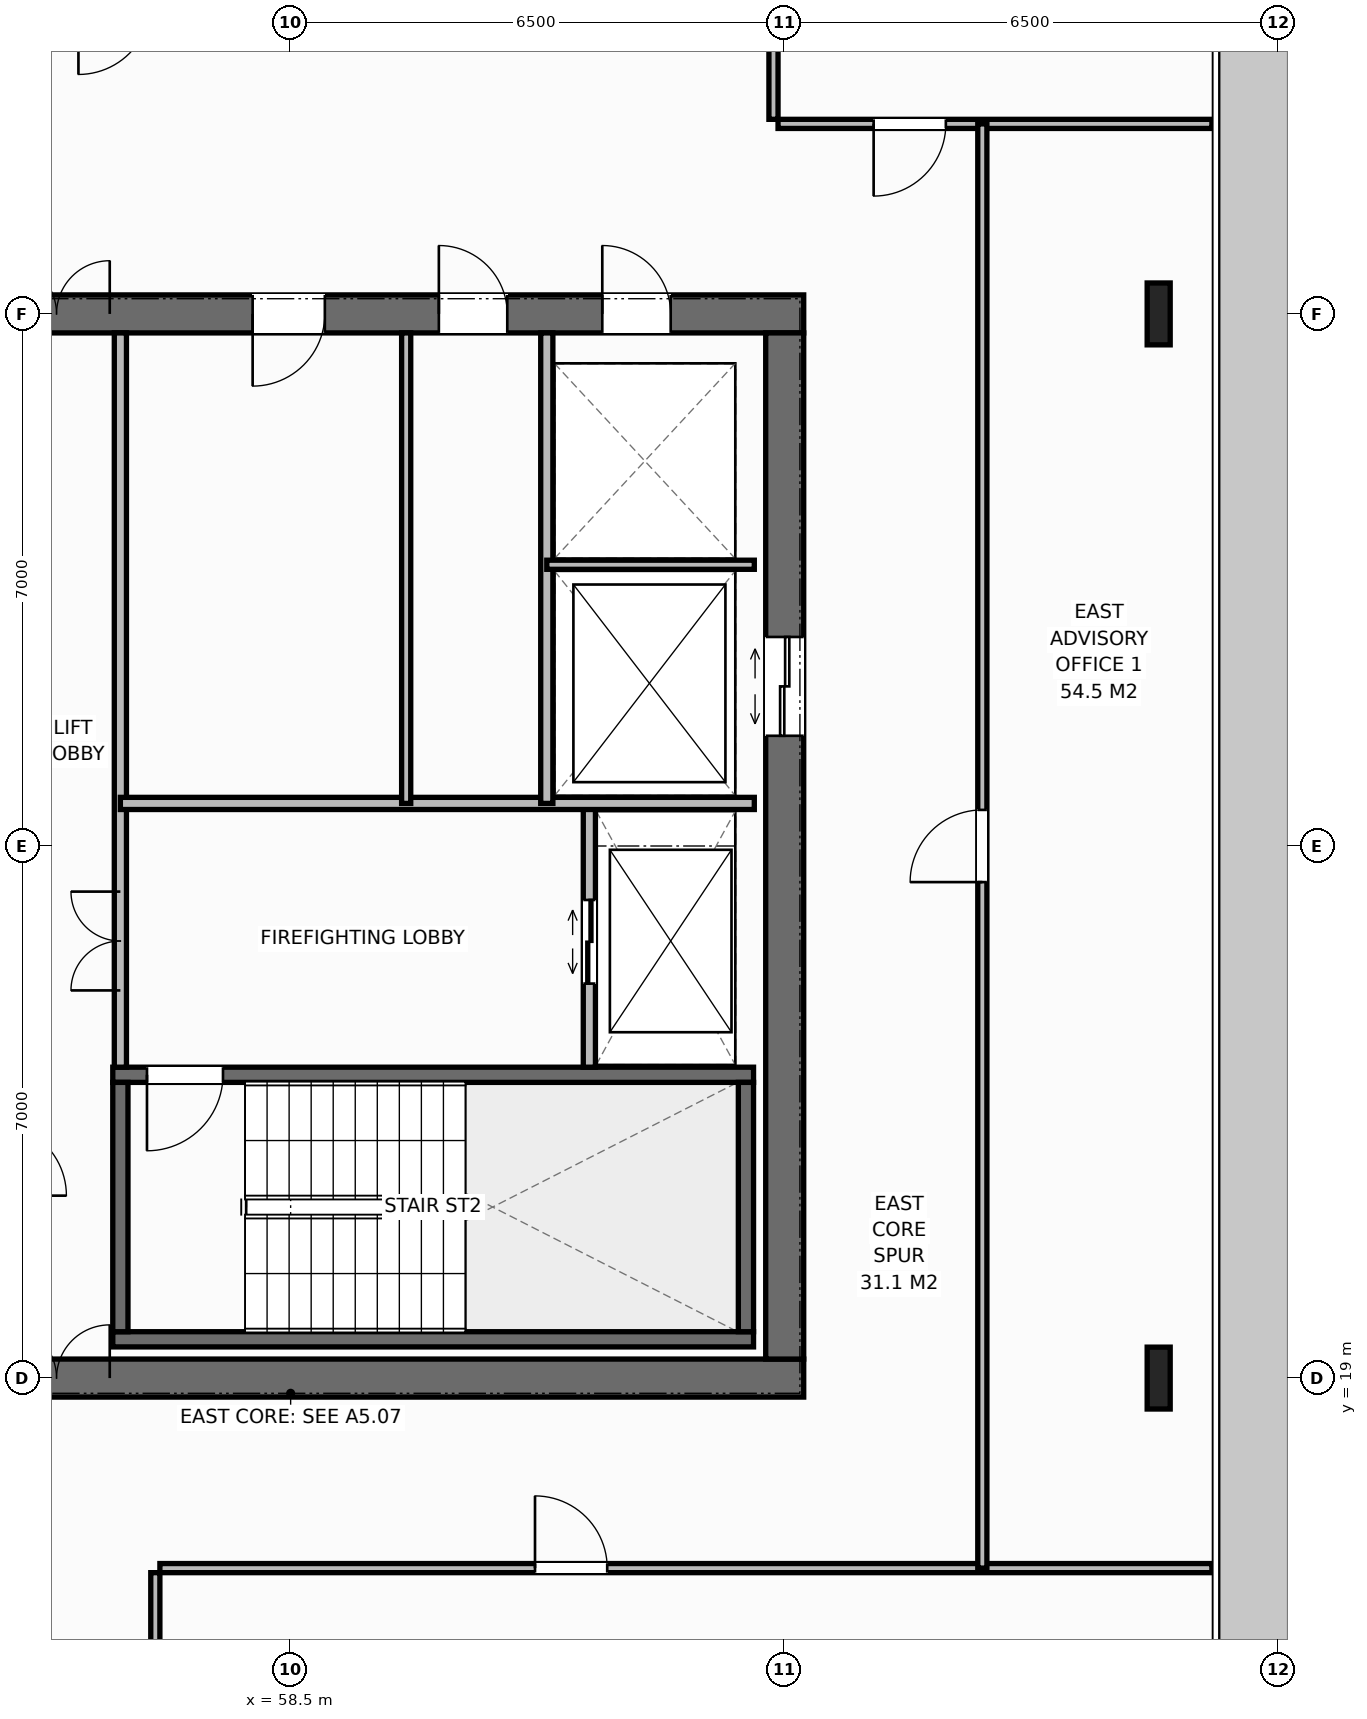
"""IFC4 building model, lengths in metres.
Left out: names, types, materials, properties, quantities, classifications, styles, units other than length and angle.
Written with IfcOpenShell. Run it as: python <this file> out.ifc"""

import sys

from ifc_helpers import new_model, si_unit, direction, frame, frame_2d, origin, origin_2d, place, context, subcontext, project, spatial, rectangle, i_section, extrude, element, fill, save


model = new_model("IFC4")
c1 = context("Model", 3, precision=1e-05, world=origin(), true_north=direction((0.0, 1.0)))
c2 = subcontext(c1, "Body", "Model", "MODEL_VIEW")
j1 = project(units=[si_unit("LENGTHUNIT", "METRE"), si_unit("PLANEANGLEUNIT", "RADIAN")], contexts=[c1])
p1 = place(None, origin())
s1 = spatial("IfcSite", under=j1, at=p1, CompositionType="ELEMENT")
p2 = place(p1, origin())
s2 = spatial("IfcBuilding", under=s1, at=p2, CompositionType="ELEMENT")
p3 = place(p2, frame((0.0, 0.0, 255.6)))
s3 = spatial("IfcBuildingStorey", under=s2, at=p3, CompositionType="ELEMENT", Elevation=255.6)
p4 = place(p3, frame((51.75, 19.0, 0.0), z_axis=(0.0, 0.0, 1.0), x_axis=(1.0, 0.0, 0.0)))
e1 = element("IfcWall", 1, at=p4, inside=s3, PredefinedType="SHEAR", context=c2, shape_type="SweptSolid", body=[
    extrude(rectangle(XDim=13.5, YDim=0.5, at=frame_2d((6.75, 0.0))), origin(), (0.0, 0.0, 1.0), 3.8),
])
p5 = place(p4, frame((2.97, 0.0, 0.0)))
e2 = element("IfcOpeningElement", 2, at=p5, cuts=e1, PredefinedType="OPENING", context=c2, shape_type="SweptSolid", body=[
    extrude(rectangle(XDim=1.4, YDim=2.2, at=frame_2d((0.7, 1.1))), frame((0.0, 0.26, 0.0), z_axis=(0.0, -1.0, 0.0), x_axis=(1.0, 0.0, 0.0)), (0.0, 0.0, 1.0), 0.52),
])
p6 = place(p3, frame((51.75, 33.0, 0.0), z_axis=(0.0, 0.0, 1.0), x_axis=(1.0, 0.0, 0.0)))
e3 = element("IfcWall", 3, at=p6, inside=s3, PredefinedType="SHEAR", context=c2, shape_type="SweptSolid", body=[
    extrude(rectangle(XDim=13.5, YDim=0.5, at=frame_2d((6.75, 0.0))), origin(), (0.0, 0.0, 1.0), 3.8),
])
p7 = place(p6, frame((2.97, 0.0, 0.0)))
e4 = element("IfcOpeningElement", 4, at=p7, cuts=e3, PredefinedType="OPENING", context=c2, shape_type="SweptSolid", body=[
    extrude(rectangle(XDim=1.4, YDim=2.2, at=frame_2d((0.7, 1.1))), frame((0.0, 0.26, 0.0), z_axis=(0.0, -1.0, 0.0), x_axis=(1.0, 0.0, 0.0)), (0.0, 0.0, 1.0), 0.52),
])
p8 = place(p6, frame((10.85, 0.0, 0.0)))
e5 = element("IfcOpeningElement", 5, at=p8, cuts=e3, PredefinedType="OPENING", context=c2, shape_type="SweptSolid", body=[
    extrude(rectangle(XDim=0.9, YDim=2.15, at=frame_2d((0.45, 1.075))), frame((0.0, 0.26, 0.0), z_axis=(0.0, -1.0, 0.0), x_axis=(1.0, 0.0, 0.0)), (0.0, 0.0, 1.0), 0.52),
])
p9 = place(p6, frame((6.25, 0.0, 0.0)))
e6 = element("IfcOpeningElement", 6, at=p9, cuts=e3, PredefinedType="OPENING", context=c2, shape_type="SweptSolid", body=[
    extrude(rectangle(XDim=0.95, YDim=2.15, at=frame_2d((0.475, 1.075))), frame((0.0, 0.26, 0.0), z_axis=(0.0, -1.0, 0.0), x_axis=(1.0, 0.0, 0.0)), (0.0, 0.0, 1.0), 0.52),
])
p10 = place(p6, frame((8.7, 0.0, 0.0)))
e7 = element("IfcOpeningElement", 7, at=p10, cuts=e3, PredefinedType="OPENING", context=c2, shape_type="SweptSolid", body=[
    extrude(rectangle(XDim=0.9, YDim=2.15, at=frame_2d((0.45, 1.075))), frame((0.0, 0.26, 0.0), z_axis=(0.0, -1.0, 0.0), x_axis=(1.0, 0.0, 0.0)), (0.0, 0.0, 1.0), 0.52),
])
p11 = place(p3, frame((65.0, 19.25, 0.0), z_axis=(0.0, 0.0, 1.0), x_axis=(0.0, 1.0, 0.0)))
e8 = element("IfcWall", 8, at=p11, inside=s3, PredefinedType="SHEAR", context=c2, shape_type="SweptSolid", body=[
    extrude(rectangle(XDim=13.5, YDim=0.5, at=frame_2d((6.75, 0.0))), origin(), (0.0, 0.0, 1.0), 3.8),
])
p12 = place(p11, frame((8.2, 0.0, 0.0)))
e9 = element("IfcOpeningElement", 9, at=p12, cuts=e8, PredefinedType="OPENING", context=c2, shape_type="SweptSolid", body=[
    extrude(rectangle(XDim=1.3, YDim=2.2, at=frame_2d((0.65, 1.1))), frame((0.0, 0.26, 0.0), z_axis=(0.0, -1.0, 0.0), x_axis=(1.0, 0.0, 0.0)), (0.0, 0.0, 1.0), 0.52),
])
p13 = place(p3, frame((56.16, 19.51, 0.0), z_axis=(0.0, 0.0, 1.0), x_axis=(1.0, 0.0, 0.0)))
e10 = element("IfcWall", 10, at=p13, inside=s3, PredefinedType="SHEAR", context=c2, shape_type="SweptSolid", body=[
    extrude(rectangle(XDim=8.43, YDim=0.2, at=frame_2d((4.215, 0.0))), origin(), (0.0, 0.0, 1.0), 3.8),
])
p14 = place(p3, frame((56.16, 22.99, 0.0), z_axis=(0.0, 0.0, 1.0), x_axis=(1.0, 0.0, 0.0)))
e11 = element("IfcWall", 11, at=p14, inside=s3, PredefinedType="SHEAR", context=c2, shape_type="SweptSolid", body=[
    extrude(rectangle(XDim=8.43, YDim=0.2, at=frame_2d((4.215, 0.0))), origin(), (0.0, 0.0, 1.0), 3.8),
])
p15 = place(p14, frame((0.45, 0.0, 0.0)))
e12 = element("IfcOpeningElement", 12, at=p15, cuts=e11, PredefinedType="OPENING", context=c2, shape_type="SweptSolid", body=[
    extrude(rectangle(XDim=1.0, YDim=2.15, at=frame_2d((0.5, 1.075))), frame((0.0, 0.11, 0.0), z_axis=(0.0, -1.0, 0.0), x_axis=(1.0, 0.0, 0.0)), (0.0, 0.0, 1.0), 0.22),
])
for number, where, z_axis, x_axis in (
    (13, (56.26, 19.61, 0.0), (0.0, 0.0, 1.0), (0.0, 1.0, 0.0)),
    (14, (64.49, 19.61, 0.0), (0.0, 0.0, 1.0), (0.0, 1.0, 0.0)),
):
    element("IfcWall", number, at=place(p3, frame(where, z_axis=z_axis, x_axis=x_axis)), inside=s3, PredefinedType="SHEAR", context=c2, shape_type="SweptSolid", body=[
        extrude(rectangle(XDim=3.28, YDim=0.2, at=frame_2d((1.64, 0.0))), origin(), (0.0, 0.0, 1.0), 3.8),
    ])
for number, where, z_axis, x_axis in (
    (15, (69.92, 19.0, 0.0), (0.0, 0.0, 1.0), (1.0, 0.0, 0.0)),
    (16, (69.92, 33.0, 0.0), (0.0, 0.0, 1.0), (1.0, 0.0, 0.0)),
):
    element("IfcColumn", number, at=place(p3, frame(where, z_axis=z_axis, x_axis=x_axis)), inside=s3, PredefinedType="COLUMN", context=c2, shape_type="SweptSolid", body=[
        extrude(i_section(OverallWidth=0.303, OverallDepth=0.814, WebThickness=0.021, FlangeThickness=0.04, at=origin_2d()), origin(), (0.0, 0.0, 1.0), 3.8),
    ])
p16 = place(p3, frame((56.26, 23.09, 0.0), z_axis=(0.0, 0.0, 1.0), x_axis=(0.0, 1.0, 0.0)))
e17 = element("IfcWall", 17, at=p16, inside=s3, PredefinedType="STANDARD", context=c2, shape_type="SweptSolid", body=[
    extrude(rectangle(XDim=9.66, YDim=0.16, at=frame_2d((4.83, 0.0))), origin(), (0.0, 0.0, 1.0), 3.588),
])
p17 = place(p16, frame((1.01, 0.0, 0.0)))
e18 = element("IfcOpeningElement", 18, at=p17, cuts=e17, PredefinedType="OPENING", context=c2, shape_type="SweptSolid", body=[
    extrude(rectangle(XDim=1.3, YDim=2.2, at=frame_2d((0.65, 1.1))), frame((0.0, 0.09, 0.0), z_axis=(0.0, -1.0, 0.0), x_axis=(1.0, 0.0, 0.0)), (0.0, 0.0, 1.0), 0.18),
])
p18 = place(p3, frame((62.43, 23.09, 0.0), z_axis=(0.0, 0.0, 1.0), x_axis=(0.0, 1.0, 0.0)))
e19 = element("IfcWall", 19, at=p18, inside=s3, PredefinedType="STANDARD", context=c2, shape_type="SweptSolid", body=[
    extrude(rectangle(XDim=3.47, YDim=0.16, at=frame_2d((1.735, 0.0))), origin(), (0.0, 0.0, 1.0), 3.588),
])
p19 = place(p18, frame((1.1, 0.0, 0.0)))
e20 = element("IfcOpeningElement", 20, at=p19, cuts=e19, PredefinedType="OPENING", context=c2, shape_type="SweptSolid", body=[
    extrude(rectangle(XDim=1.1, YDim=2.2, at=frame_2d((0.55, 1.1))), frame((0.0, 0.09, 0.0), z_axis=(0.0, -1.0, 0.0), x_axis=(1.0, 0.0, 0.0)), (0.0, 0.0, 1.0), 0.18),
])
p20 = place(p3, frame((56.26, 26.56, 0.0), z_axis=(0.0, 0.0, 1.0), x_axis=(1.0, 0.0, 0.0)))
e21 = element("IfcWall", 21, at=p20, inside=s3, PredefinedType="STANDARD", context=c2, shape_type="SweptSolid", body=[
    extrude(rectangle(XDim=8.34, YDim=0.16, at=frame_2d((4.17, 0.0))), origin(), (0.0, 0.0, 1.0), 3.588),
])
p21 = place(p3, frame((61.87, 26.56, 0.0), z_axis=(0.0, 0.0, 1.0), x_axis=(0.0, 1.0, 0.0)))
e22 = element("IfcWall", 22, at=p21, inside=s3, PredefinedType="STANDARD", context=c2, shape_type="SweptSolid", body=[
    extrude(rectangle(XDim=6.19, YDim=0.16, at=frame_2d((3.095, 0.0))), origin(), (0.0, 0.0, 1.0), 3.588),
])
p22 = place(p3, frame((61.87, 29.7, 0.0), z_axis=(0.0, 0.0, 1.0), x_axis=(1.0, 0.0, 0.0)))
e23 = element("IfcWall", 23, at=p22, inside=s3, PredefinedType="PARTITIONING", context=c2, shape_type="SweptSolid", body=[
    extrude(rectangle(XDim=2.73, YDim=0.12, at=frame_2d((1.365, 0.0))), origin(), (0.0, 0.0, 1.0), 3.588),
])
p23 = place(p3, frame((60.02, 26.56, 0.0), z_axis=(0.0, 0.0, 1.0), x_axis=(0.0, 1.0, 0.0)))
e24 = element("IfcWall", 24, at=p23, inside=s3, PredefinedType="PARTITIONING", context=c2, shape_type="SweptSolid", body=[
    extrude(rectangle(XDim=6.19, YDim=0.12, at=frame_2d((3.095, 0.0))), origin(), (0.0, 0.0, 1.0), 3.588),
])
p24 = place(p3, frame((64.852, 35.56, 0.0), z_axis=(0.0, 0.0, 1.0), x_axis=(0.0, 1.0, 0.0)))
e25 = element("IfcWall", 25, at=p24, inside=s3, PredefinedType="PARTITIONING", context=c2, shape_type="SweptSolid", body=[
    extrude(rectangle(XDim=11.32, YDim=0.12, at=frame_2d((5.66, 0.0))), origin(), (0.0, 0.0, 1.0), 2.788),
])
p25 = place(p3, frame((64.912, 35.5, 0.0), z_axis=(0.0, 0.0, 1.0), x_axis=(1.0, 0.0, 0.0)))
e26 = element("IfcWall", 26, at=p25, inside=s3, PredefinedType="PARTITIONING", context=c2, shape_type="SweptSolid", body=[
    extrude(rectangle(XDim=5.708, YDim=0.12, at=frame_2d((2.854, 0.0))), origin(), (0.0, 0.0, 1.0), 3.588),
])
p26 = place(p25, frame((1.258, 0.0, 0.0)))
e27 = element("IfcOpeningElement", 27, at=p26, cuts=e26, PredefinedType="OPENING", context=c2, shape_type="SweptSolid", body=[
    extrude(rectangle(XDim=0.95, YDim=2.15, at=frame_2d((0.475, 1.075))), frame((0.0, 0.07, 0.0), z_axis=(0.0, -1.0, 0.0), x_axis=(1.0, 0.0, 0.0)), (0.0, 0.0, 1.0), 0.14),
])
p27 = place(p3, frame((56.72, 5.12, 0.0), z_axis=(0.0, 0.0, 1.0), x_axis=(0.0, 1.0, 0.0)))
e28 = element("IfcWall", 28, at=p27, inside=s3, PredefinedType="PARTITIONING", context=c2, shape_type="SweptSolid", body=[
    extrude(rectangle(XDim=11.32, YDim=0.12, at=frame_2d((5.66, 0.0))), origin(), (0.0, 0.0, 1.0), 3.588),
])
p28 = place(p3, frame((56.78, 16.5, 0.0), z_axis=(0.0, 0.0, 1.0), x_axis=(1.0, 0.0, 0.0)))
e29 = element("IfcWall", 29, at=p28, inside=s3, PredefinedType="PARTITIONING", context=c2, shape_type="SweptSolid", body=[
    extrude(rectangle(XDim=13.84, YDim=0.12, at=frame_2d((6.92, 0.0))), origin(), (0.0, 0.0, 1.0), 3.588),
])
p29 = place(p28, frame((4.935, 0.0, 0.0)))
e30 = element("IfcOpeningElement", 30, at=p29, cuts=e29, PredefinedType="OPENING", context=c2, shape_type="SweptSolid", body=[
    extrude(rectangle(XDim=0.95, YDim=2.15, at=frame_2d((0.475, 1.075))), frame((0.0, 0.07, 0.0), z_axis=(0.0, -1.0, 0.0), x_axis=(1.0, 0.0, 0.0)), (0.0, 0.0, 1.0), 0.14),
])
p30 = place(p3, frame((67.6, 16.5, 0.0), z_axis=(0.0, 0.0, 1.0), x_axis=(0.0, 1.0, 0.0)))
e31 = element("IfcWall", 31, at=p30, inside=s3, PredefinedType="PARTITIONING", context=c2, shape_type="SweptSolid", body=[
    extrude(rectangle(XDim=19.0, YDim=0.12, at=frame_2d((9.5, 0.0))), origin(), (0.0, 0.0, 1.0), 3.588),
])
p31 = place(p30, frame((9.025, 0.0, 0.0)))
e32 = element("IfcOpeningElement", 32, at=p31, cuts=e31, PredefinedType="OPENING", context=c2, shape_type="SweptSolid", body=[
    extrude(rectangle(XDim=0.95, YDim=2.15, at=frame_2d((0.475, 1.075))), frame((0.0, 0.07, 0.0), z_axis=(0.0, -1.0, 0.0), x_axis=(1.0, 0.0, 0.0)), (0.0, 0.0, 1.0), 0.14),
])
p32 = place(p5, origin())
e33 = element("IfcDoor", 33, at=p32, inside=s3, OperationType="DOUBLE_DOOR_SINGLE_SWING", PredefinedType="DOOR", context=c2, shape_type="SweptSolid", body=[
    extrude(rectangle(XDim=1.4, YDim=2.2, at=frame_2d((0.7, 1.1))), frame((0.0, 0.075, 0.0), z_axis=(0.0, -1.0, 0.0), x_axis=(1.0, 0.0, 0.0)), (0.0, 0.0, 1.0), 0.05),
])
fill(e2, e33)
p33 = place(p7, origin())
e34 = element("IfcDoor", 34, at=p33, inside=s3, OperationType="DOUBLE_DOOR_SINGLE_SWING", PredefinedType="DOOR", context=c2, shape_type="SweptSolid", body=[
    extrude(rectangle(XDim=1.4, YDim=2.2, at=frame_2d((0.7, 1.1))), frame((0.0, -0.025, 0.0), z_axis=(0.0, -1.0, 0.0), x_axis=(1.0, 0.0, 0.0)), (0.0, 0.0, 1.0), 0.05),
])
fill(e4, e34)
p34 = place(p15, origin())
e35 = element("IfcDoor", 35, at=p34, inside=s3, OperationType="SINGLE_SWING_RIGHT", PredefinedType="DOOR", context=c2, shape_type="SweptSolid", body=[
    extrude(rectangle(XDim=1.0, YDim=2.15, at=frame_2d((0.5, 1.075))), frame((0.0, 0.025, 0.0), z_axis=(0.0, -1.0, 0.0), x_axis=(1.0, 0.0, 0.0)), (0.0, 0.0, 1.0), 0.05),
])
fill(e12, e35)
p35 = place(p19, origin())
e36 = element("IfcDoor", 36, at=p35, inside=s3, OperationType="DOUBLE_DOOR_SLIDING", PredefinedType="DOOR", context=c2, shape_type="SweptSolid", body=[
    extrude(rectangle(XDim=1.1, YDim=2.2, at=frame_2d((0.55, 1.1))), frame((0.0, 0.025, 0.0), z_axis=(0.0, -1.0, 0.0), x_axis=(1.0, 0.0, 0.0)), (0.0, 0.0, 1.0), 0.05),
])
fill(e20, e36)
p36 = place(p17, origin())
e37 = element("IfcDoor", 37, at=p36, inside=s3, OperationType="DOUBLE_DOOR_SINGLE_SWING", PredefinedType="DOOR", context=c2, shape_type="SweptSolid", body=[
    extrude(rectangle(XDim=1.3, YDim=2.2, at=frame_2d((0.65, 1.1))), frame((0.0, 0.025, 0.0), z_axis=(0.0, -1.0, 0.0), x_axis=(1.0, 0.0, 0.0)), (0.0, 0.0, 1.0), 0.05),
])
fill(e18, e37)
p37 = place(p12, origin())
e38 = element("IfcDoor", 38, at=p37, inside=s3, OperationType="DOUBLE_DOOR_SLIDING", PredefinedType="DOOR", context=c2, shape_type="SweptSolid", body=[
    extrude(rectangle(XDim=1.3, YDim=2.2, at=frame_2d((0.65, 1.1))), frame((0.0, 0.025, 0.0), z_axis=(0.0, -1.0, 0.0), x_axis=(1.0, 0.0, 0.0)), (0.0, 0.0, 1.0), 0.05),
])
fill(e9, e38)
p38 = place(p8, origin())
e39 = element("IfcDoor", 39, at=p38, inside=s3, OperationType="SINGLE_SWING_LEFT", PredefinedType="DOOR", context=c2, shape_type="SweptSolid", body=[
    extrude(rectangle(XDim=0.9, YDim=2.15, at=frame_2d((0.45, 1.075))), frame((0.0, -0.025, 0.0), z_axis=(0.0, -1.0, 0.0), x_axis=(1.0, 0.0, 0.0)), (0.0, 0.0, 1.0), 0.05),
])
fill(e5, e39)
p39 = place(p9, origin())
e40 = element("IfcDoor", 40, at=p39, inside=s3, OperationType="SINGLE_SWING_RIGHT", PredefinedType="DOOR", context=c2, shape_type="SweptSolid", body=[
    extrude(rectangle(XDim=0.95, YDim=2.15, at=frame_2d((0.475, 1.075))), frame((0.0, -0.025, 0.0), z_axis=(0.0, -1.0, 0.0), x_axis=(1.0, 0.0, 0.0)), (0.0, 0.0, 1.0), 0.05),
])
fill(e6, e40)
p40 = place(p10, origin())
e41 = element("IfcDoor", 41, at=p40, inside=s3, OperationType="SINGLE_SWING_LEFT", PredefinedType="DOOR", context=c2, shape_type="SweptSolid", body=[
    extrude(rectangle(XDim=0.9, YDim=2.15, at=frame_2d((0.45, 1.075))), frame((0.0, -0.025, 0.0), z_axis=(0.0, -1.0, 0.0), x_axis=(1.0, 0.0, 0.0)), (0.0, 0.0, 1.0), 0.05),
])
fill(e7, e41)
p41 = place(p26, origin())
e42 = element("IfcDoor", 42, at=p41, inside=s3, OperationType="SINGLE_SWING_RIGHT", PredefinedType="DOOR", context=c2, shape_type="SweptSolid", body=[
    extrude(rectangle(XDim=0.95, YDim=2.15, at=frame_2d((0.475, 1.075))), frame((0.0, 0.025, 0.0), z_axis=(0.0, -1.0, 0.0), x_axis=(1.0, 0.0, 0.0)), (0.0, 0.0, 1.0), 0.05),
])
fill(e27, e42)
p42 = place(p29, origin())
e43 = element("IfcDoor", 43, at=p42, inside=s3, OperationType="SINGLE_SWING_LEFT", PredefinedType="DOOR", context=c2, shape_type="SweptSolid", body=[
    extrude(rectangle(XDim=0.95, YDim=2.15, at=frame_2d((0.475, 1.075))), frame((0.0, 0.025, 0.0), z_axis=(0.0, -1.0, 0.0), x_axis=(1.0, 0.0, 0.0)), (0.0, 0.0, 1.0), 0.05),
])
fill(e30, e43)
p43 = place(p31, origin())
e44 = element("IfcDoor", 44, at=p43, inside=s3, OperationType="SINGLE_SWING_LEFT", PredefinedType="DOOR", context=c2, shape_type="SweptSolid", body=[
    extrude(rectangle(XDim=0.95, YDim=2.15, at=frame_2d((0.475, 1.075))), frame((0.0, 0.025, 0.0), z_axis=(0.0, -1.0, 0.0), x_axis=(1.0, 0.0, 0.0)), (0.0, 0.0, 1.0), 0.05),
])
fill(e32, e44)
save(model, sys.argv[1])
